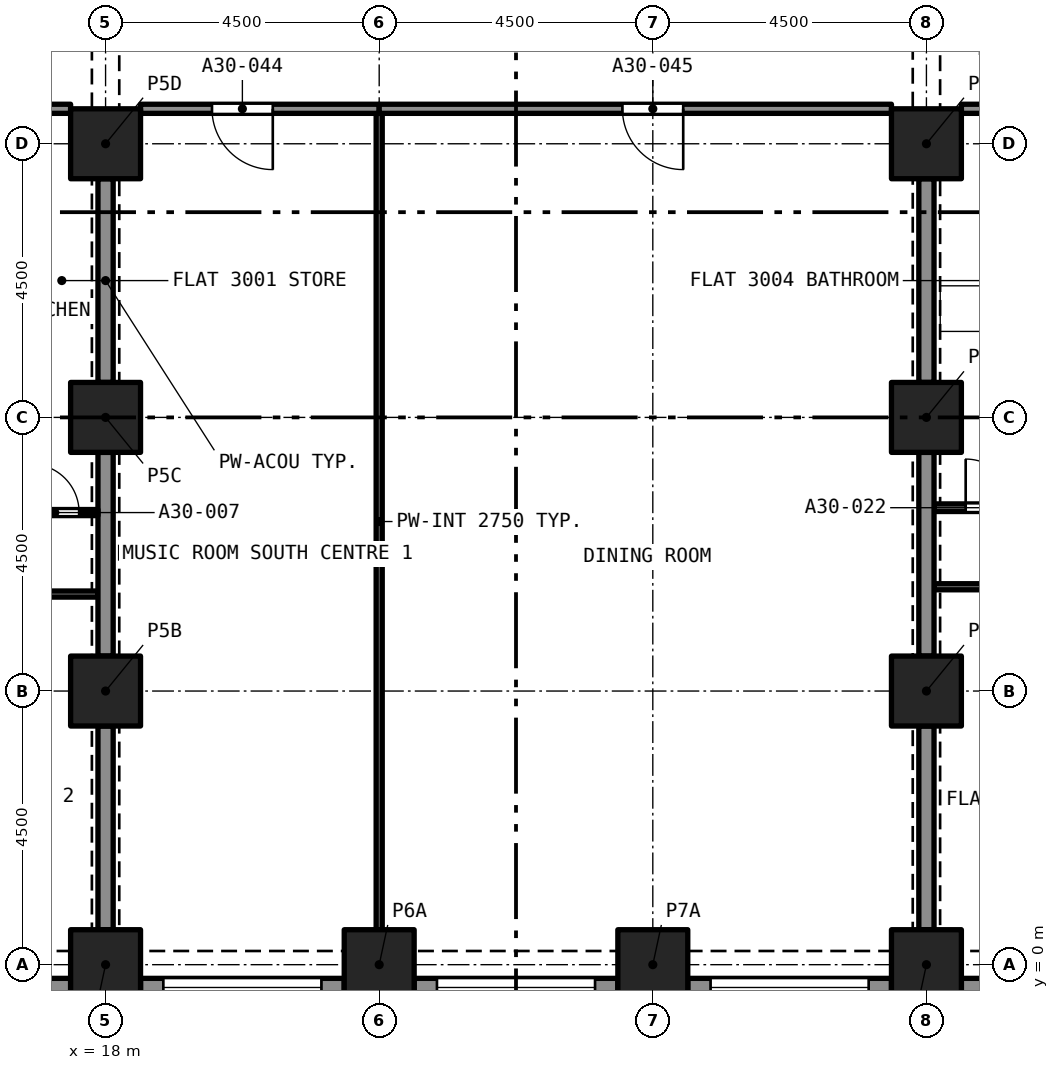
"""IFC4 building model, lengths in metres.
Left out: names, types, materials, properties, quantities, classifications, styles, units other than length and angle.
Written with IfcOpenShell. Run it as: python <this file> out.ifc"""

import sys

from ifc_helpers import new_model, si_unit, direction, frame, frame_2d, origin, origin_2d, place, context, subcontext, project, spatial, rectangle, extrude, element, fill, save


model = new_model("IFC4")
c1 = context("Model", 3, precision=1e-05, world=origin(), true_north=direction((0.0, 1.0)))
c2 = subcontext(c1, "Body", "Model", "MODEL_VIEW")
j1 = project(units=[si_unit("LENGTHUNIT", "METRE"), si_unit("PLANEANGLEUNIT", "RADIAN")], contexts=[c1])
p1 = place(None, origin())
s1 = spatial("IfcSite", under=j1, at=p1, CompositionType="ELEMENT")
p2 = place(p1, origin())
s2 = spatial("IfcBuilding", under=s1, at=p2, CompositionType="ELEMENT")
p3 = place(p2, frame((0.0, 0.0, 108.8)))
s3 = spatial("IfcBuildingStorey", under=s2, at=p3, CompositionType="ELEMENT", Elevation=108.8)
for number, where, z_axis, x_axis in (
    (1, (18.0, 0.0, 0.0), (0.0, 0.0, 1.0), (1.0, 0.0, 0.0)),
    (2, (22.5, 0.0, 0.0), (0.0, 0.0, 1.0), (1.0, 0.0, 0.0)),
    (3, (27.0, 0.0, 0.0), (0.0, 0.0, 1.0), (1.0, 0.0, 0.0)),
    (4, (31.5, 0.0, 0.0), (0.0, 0.0, 1.0), (1.0, 0.0, 0.0)),
    (5, (18.0, 4.5, 0.0), (0.0, 0.0, 1.0), (1.0, 0.0, 0.0)),
    (6, (31.5, 4.5, 0.0), (0.0, 0.0, 1.0), (1.0, 0.0, 0.0)),
    (7, (18.0, 9.0, 0.0), (0.0, 0.0, 1.0), (1.0, 0.0, 0.0)),
    (8, (31.5, 9.0, 0.0), (0.0, 0.0, 1.0), (1.0, 0.0, 0.0)),
    (9, (18.0, 13.5, 0.0), (0.0, 0.0, 1.0), (1.0, 0.0, 0.0)),
    (10, (31.5, 13.5, 0.0), (0.0, 0.0, 1.0), (1.0, 0.0, 0.0)),
):
    element("IfcColumn", number, at=place(p3, frame(where, z_axis=z_axis, x_axis=x_axis)), inside=s3, PredefinedType="COLUMN", context=c2, shape_type="SweptSolid", body=[
        extrude(rectangle(XDim=1.15, YDim=1.15, at=origin_2d()), origin(), (0.0, 0.0, 1.0), 3.2),
    ])
p4 = place(p3, frame((17.425, -0.375, 0.0), z_axis=(0.0, 0.0, 1.0), x_axis=(-1.0, 0.0, 0.0)))
e11 = element("IfcWall", 11, at=p4, inside=s3, PredefinedType="SOLIDWALL", context=c2, shape_type="SweptSolid", body=[
    extrude(rectangle(XDim=3.35, YDim=0.3, at=frame_2d((1.675, 0.0))), origin(), (0.0, 0.0, 1.0), 3.2),
])
p5 = place(p4, frame((0.375, 0.0, 0.45)))
e12 = element("IfcOpeningElement", 12, at=p5, cuts=e11, PredefinedType="OPENING", context=c2, shape_type="SweptSolid", body=[
    extrude(rectangle(XDim=2.6, YDim=1.95, at=frame_2d((1.3, 0.975))), frame((0.0, 0.16, 0.0), z_axis=(0.0, -1.0, 0.0), x_axis=(1.0, 0.0, 0.0)), (0.0, 0.0, 1.0), 0.32),
])
p6 = place(p3, frame((21.925, -0.375, 0.0), z_axis=(0.0, 0.0, 1.0), x_axis=(-1.0, 0.0, 0.0)))
e13 = element("IfcWall", 13, at=p6, inside=s3, PredefinedType="SOLIDWALL", context=c2, shape_type="SweptSolid", body=[
    extrude(rectangle(XDim=3.35, YDim=0.3, at=frame_2d((1.675, 0.0))), origin(), (0.0, 0.0, 1.0), 3.2),
])
p7 = place(p6, frame((0.375, 0.0, 0.45)))
e14 = element("IfcOpeningElement", 14, at=p7, cuts=e13, PredefinedType="OPENING", context=c2, shape_type="SweptSolid", body=[
    extrude(rectangle(XDim=2.6, YDim=1.95, at=frame_2d((1.3, 0.975))), frame((0.0, 0.16, 0.0), z_axis=(0.0, -1.0, 0.0), x_axis=(1.0, 0.0, 0.0)), (0.0, 0.0, 1.0), 0.32),
])
p8 = place(p3, frame((26.425, -0.375, 0.0), z_axis=(0.0, 0.0, 1.0), x_axis=(-1.0, 0.0, 0.0)))
e15 = element("IfcWall", 15, at=p8, inside=s3, PredefinedType="SOLIDWALL", context=c2, shape_type="SweptSolid", body=[
    extrude(rectangle(XDim=3.35, YDim=0.3, at=frame_2d((1.675, 0.0))), origin(), (0.0, 0.0, 1.0), 3.2),
])
p9 = place(p8, frame((0.375, 0.0, 0.45)))
e16 = element("IfcOpeningElement", 16, at=p9, cuts=e15, PredefinedType="OPENING", context=c2, shape_type="SweptSolid", body=[
    extrude(rectangle(XDim=2.6, YDim=1.95, at=frame_2d((1.3, 0.975))), frame((0.0, 0.16, 0.0), z_axis=(0.0, -1.0, 0.0), x_axis=(1.0, 0.0, 0.0)), (0.0, 0.0, 1.0), 0.32),
])
p10 = place(p3, frame((30.925, -0.375, 0.0), z_axis=(0.0, 0.0, 1.0), x_axis=(-1.0, 0.0, 0.0)))
e17 = element("IfcWall", 17, at=p10, inside=s3, PredefinedType="SOLIDWALL", context=c2, shape_type="SweptSolid", body=[
    extrude(rectangle(XDim=3.35, YDim=0.3, at=frame_2d((1.675, 0.0))), origin(), (0.0, 0.0, 1.0), 3.2),
])
p11 = place(p10, frame((0.375, 0.0, 0.45)))
e18 = element("IfcOpeningElement", 18, at=p11, cuts=e17, PredefinedType="OPENING", context=c2, shape_type="SweptSolid", body=[
    extrude(rectangle(XDim=2.6, YDim=1.95, at=frame_2d((1.3, 0.975))), frame((0.0, 0.16, 0.0), z_axis=(0.0, -1.0, 0.0), x_axis=(1.0, 0.0, 0.0)), (0.0, 0.0, 1.0), 0.32),
])
p12 = place(p3, frame((35.425, -0.375, 0.0), z_axis=(0.0, 0.0, 1.0), x_axis=(-1.0, 0.0, 0.0)))
e19 = element("IfcWall", 19, at=p12, inside=s3, PredefinedType="SOLIDWALL", context=c2, shape_type="SweptSolid", body=[
    extrude(rectangle(XDim=3.35, YDim=0.3, at=frame_2d((1.675, 0.0))), origin(), (0.0, 0.0, 1.0), 3.2),
])
p13 = place(p12, frame((0.375, 0.0, 0.45)))
e20 = element("IfcOpeningElement", 20, at=p13, cuts=e19, PredefinedType="OPENING", context=c2, shape_type="SweptSolid", body=[
    extrude(rectangle(XDim=2.6, YDim=1.95, at=frame_2d((1.3, 0.975))), frame((0.0, 0.16, 0.0), z_axis=(0.0, -1.0, 0.0), x_axis=(1.0, 0.0, 0.0)), (0.0, 0.0, 1.0), 0.32),
])
p14 = place(p3, frame((17.875, 6.095, 0.0), z_axis=(0.0, 0.0, 1.0), x_axis=(-1.0, 0.0, 0.0)))
e21 = element("IfcWall", 21, at=p14, inside=s3, PredefinedType="PARTITIONING", context=c2, shape_type="SweptSolid", body=[
    extrude(rectangle(XDim=4.375, YDim=0.1, at=frame_2d((2.188, 0.0))), origin(), (0.0, 0.0, 1.0), 2.9),
])
p15 = place(p14, frame((1.675, 0.0, 0.0)))
e22 = element("IfcOpeningElement", 22, at=p15, cuts=e21, PredefinedType="OPENING", context=c2, shape_type="SweptSolid", body=[
    extrude(rectangle(XDim=0.9, YDim=2.1, at=frame_2d((0.45, 1.05))), frame((0.0, 0.06, 0.0), z_axis=(0.0, -1.0, 0.0), x_axis=(1.0, 0.0, 0.0)), (0.0, 0.0, 1.0), 0.12),
])
for number, where, z_axis, x_axis in (
    (23, (18.0, 5.075, 0.0), (0.0, 0.0, 1.0), (0.0, 1.0, 0.0)),
    (24, (18.0, 0.575, 0.0), (0.0, 0.0, 1.0), (0.0, 1.0, 0.0)),
):
    element("IfcWall", number, at=place(p3, frame(where, z_axis=z_axis, x_axis=x_axis)), inside=s3, PredefinedType="PARTITIONING", context=c2, shape_type="SweptSolid", body=[
        extrude(rectangle(XDim=3.35, YDim=0.25, at=frame_2d((1.675, 0.0))), origin(), (0.0, 0.0, 1.0), 2.38),
    ])
p16 = place(p3, frame((16.635, 7.435, 0.0), z_axis=(0.0, 0.0, 1.0), x_axis=(1.0, 0.0, 0.0)))
e25 = element("IfcWall", 25, at=p16, inside=s3, PredefinedType="PARTITIONING", context=c2, shape_type="SweptSolid", body=[
    extrude(rectangle(XDim=1.24, YDim=0.1, at=frame_2d((0.62, 0.0))), origin(), (0.0, 0.0, 1.0), 2.9),
])
p17 = place(p16, frame((0.13, 0.0, 0.0)))
e26 = element("IfcOpeningElement", 26, at=p17, cuts=e25, PredefinedType="OPENING", context=c2, shape_type="SweptSolid", body=[
    extrude(rectangle(XDim=0.8, YDim=2.1, at=frame_2d((0.4, 1.05))), frame((0.0, 0.06, 0.0), z_axis=(0.0, -1.0, 0.0), x_axis=(1.0, 0.0, 0.0)), (0.0, 0.0, 1.0), 0.12),
])
p18 = place(p3, frame((14.25, 14.075, 0.0), z_axis=(0.0, 0.0, 1.0), x_axis=(1.0, 0.0, 0.0)))
e27 = element("IfcWall", 27, at=p18, inside=s3, PredefinedType="PARTITIONING", context=c2, shape_type="SweptSolid", body=[
    extrude(rectangle(XDim=3.175, YDim=0.15, at=frame_2d((1.587, 0.0))), origin(), (0.0, 0.0, 1.0), 2.9),
])
p19 = place(p3, frame((18.0, 9.575, 0.0), z_axis=(0.0, 0.0, 1.0), x_axis=(0.0, 1.0, 0.0)))
e28 = element("IfcWall", 28, at=p19, inside=s3, PredefinedType="PARTITIONING", context=c2, shape_type="SweptSolid", body=[
    extrude(rectangle(XDim=3.35, YDim=0.25, at=frame_2d((1.675, 0.0))), origin(), (0.0, 0.0, 1.0), 2.38),
])
p20 = place(p3, frame((31.625, 7.515, 0.0), z_axis=(0.0, 0.0, 1.0), x_axis=(1.0, 0.0, 0.0)))
e29 = element("IfcWall", 29, at=p20, inside=s3, PredefinedType="PARTITIONING", context=c2, shape_type="SweptSolid", body=[
    extrude(rectangle(XDim=1.966, YDim=0.125, at=frame_2d((0.983, 0.0))), origin(), (0.0, 0.0, 1.0), 2.9),
])
p21 = place(p20, frame((0.521, 0.0, 0.0)))
e30 = element("IfcOpeningElement", 30, at=p21, cuts=e29, PredefinedType="OPENING", context=c2, shape_type="SweptSolid", body=[
    extrude(rectangle(XDim=0.8, YDim=2.1, at=frame_2d((0.4, 1.05))), frame((0.0, 0.073, 0.0), z_axis=(0.0, -1.0, 0.0), x_axis=(1.0, 0.0, 0.0)), (0.0, 0.0, 1.0), 0.145),
])
p22 = place(p3, frame((31.5, 9.575, 0.0), z_axis=(0.0, 0.0, 1.0), x_axis=(0.0, 1.0, 0.0)))
e31 = element("IfcWall", 31, at=p22, inside=s3, PredefinedType="PARTITIONING", context=c2, shape_type="SweptSolid", body=[
    extrude(rectangle(XDim=3.35, YDim=0.25, at=frame_2d((1.675, 0.0))), origin(), (0.0, 0.0, 1.0), 2.38),
])
p23 = place(p3, frame((32.075, 14.075, 0.0), z_axis=(0.0, 0.0, 1.0), x_axis=(1.0, 0.0, 0.0)))
e32 = element("IfcWall", 32, at=p23, inside=s3, PredefinedType="PARTITIONING", context=c2, shape_type="SweptSolid", body=[
    extrude(rectangle(XDim=3.175, YDim=0.15, at=frame_2d((1.587, 0.0))), origin(), (0.0, 0.0, 1.0), 2.9),
])
p24 = place(p3, frame((36.0, 6.215, 0.0), z_axis=(0.0, 0.0, 1.0), x_axis=(-1.0, 0.0, 0.0)))
e33 = element("IfcWall", 33, at=p24, inside=s3, PredefinedType="PARTITIONING", context=c2, shape_type="SweptSolid", body=[
    extrude(rectangle(XDim=4.375, YDim=0.1, at=frame_2d((2.188, 0.0))), origin(), (0.0, 0.0, 1.0), 2.9),
])
p25 = place(p24, frame((1.75, 0.0, 0.0)))
e34 = element("IfcOpeningElement", 34, at=p25, cuts=e33, PredefinedType="OPENING", context=c2, shape_type="SweptSolid", body=[
    extrude(rectangle(XDim=1.0, YDim=2.1, at=frame_2d((0.5, 1.05))), frame((0.0, 0.06, 0.0), z_axis=(0.0, -1.0, 0.0), x_axis=(1.0, 0.0, 0.0)), (0.0, 0.0, 1.0), 0.12),
])
for number, where, z_axis, x_axis in (
    (35, (31.5, 0.575, 0.0), (0.0, 0.0, 1.0), (0.0, 1.0, 0.0)),
    (36, (31.5, 5.075, 0.0), (0.0, 0.0, 1.0), (0.0, 1.0, 0.0)),
):
    element("IfcWall", number, at=place(p3, frame(where, z_axis=z_axis, x_axis=x_axis)), inside=s3, PredefinedType="PARTITIONING", context=c2, shape_type="SweptSolid", body=[
        extrude(rectangle(XDim=3.35, YDim=0.25, at=frame_2d((1.675, 0.0))), origin(), (0.0, 0.0, 1.0), 2.38),
    ])
p26 = place(p3, frame((22.5, 0.575, 0.0), z_axis=(0.0, 0.0, 1.0), x_axis=(0.0, 1.0, 0.0)))
e37 = element("IfcWall", 37, at=p26, inside=s3, PredefinedType="PARTITIONING", context=c2, shape_type="SweptSolid", body=[
    extrude(rectangle(XDim=13.425, YDim=0.1, at=frame_2d((6.712, 0.0))), origin(), (0.0, 0.0, 1.0), 2.75),
])
p27 = place(p3, frame((22.5, 14.075, 0.0), z_axis=(0.0, 0.0, 1.0), x_axis=(-1.0, 0.0, 0.0)))
e38 = element("IfcWall", 38, at=p27, inside=s3, PredefinedType="PARTITIONING", context=c2, shape_type="SweptSolid", body=[
    extrude(rectangle(XDim=3.925, YDim=0.15, at=frame_2d((1.962, 0.0))), origin(), (0.0, 0.0, 1.0), 2.75),
])
p28 = place(p27, frame((1.75, 0.0, 0.0)))
e39 = element("IfcOpeningElement", 39, at=p28, cuts=e38, PredefinedType="OPENING", context=c2, shape_type="SweptSolid", body=[
    extrude(rectangle(XDim=1.0, YDim=2.1, at=frame_2d((0.5, 1.05))), frame((0.0, 0.085, 0.0), z_axis=(0.0, -1.0, 0.0), x_axis=(1.0, 0.0, 0.0)), (0.0, 0.0, 1.0), 0.17),
])
p29 = place(p3, frame((30.925, 14.075, 0.0), z_axis=(0.0, 0.0, 1.0), x_axis=(-1.0, 0.0, 0.0)))
e40 = element("IfcWall", 40, at=p29, inside=s3, PredefinedType="PARTITIONING", context=c2, shape_type="SweptSolid", body=[
    extrude(rectangle(XDim=8.425, YDim=0.15, at=frame_2d((4.212, 0.0))), origin(), (0.0, 0.0, 1.0), 2.75),
])
p30 = place(p29, frame((3.425, 0.0, 0.0)))
e41 = element("IfcOpeningElement", 41, at=p30, cuts=e40, PredefinedType="OPENING", context=c2, shape_type="SweptSolid", body=[
    extrude(rectangle(XDim=1.0, YDim=2.1, at=frame_2d((0.5, 1.05))), frame((0.0, 0.085, 0.0), z_axis=(0.0, -1.0, 0.0), x_axis=(1.0, 0.0, 0.0)), (0.0, 0.0, 1.0), 0.17),
])
p31 = place(p7, origin())
e42 = element("IfcWindow", 42, at=p31, inside=s3, PartitioningType="SINGLE_PANEL", PredefinedType="WINDOW", context=c2, shape_type="SweptSolid", body=[
    extrude(rectangle(XDim=2.6, YDim=1.95, at=frame_2d((1.3, 0.975))), frame((0.0, 0.03, 0.0), z_axis=(0.0, -1.0, 0.0), x_axis=(1.0, 0.0, 0.0)), (0.0, 0.0, 1.0), 0.06),
])
fill(e14, e42)
p32 = place(p9, origin())
e43 = element("IfcWindow", 43, at=p32, inside=s3, PartitioningType="SINGLE_PANEL", PredefinedType="WINDOW", context=c2, shape_type="SweptSolid", body=[
    extrude(rectangle(XDim=2.6, YDim=1.95, at=frame_2d((1.3, 0.975))), frame((0.0, 0.03, 0.0), z_axis=(0.0, -1.0, 0.0), x_axis=(1.0, 0.0, 0.0)), (0.0, 0.0, 1.0), 0.06),
])
fill(e16, e43)
p33 = place(p11, origin())
e44 = element("IfcWindow", 44, at=p33, inside=s3, PartitioningType="SINGLE_PANEL", PredefinedType="WINDOW", context=c2, shape_type="SweptSolid", body=[
    extrude(rectangle(XDim=2.6, YDim=1.95, at=frame_2d((1.3, 0.975))), frame((0.0, 0.03, 0.0), z_axis=(0.0, -1.0, 0.0), x_axis=(1.0, 0.0, 0.0)), (0.0, 0.0, 1.0), 0.06),
])
fill(e18, e44)
p34 = place(p17, origin())
e45 = element("IfcDoor", 45, at=p34, inside=s3, OperationType="SINGLE_SWING_LEFT", PredefinedType="DOOR", context=c2, shape_type="SweptSolid", body=[
    extrude(rectangle(XDim=0.8, YDim=2.1, at=frame_2d((0.4, 1.05))), frame((0.0, 0.025, 0.0), z_axis=(0.0, -1.0, 0.0), x_axis=(1.0, 0.0, 0.0)), (0.0, 0.0, 1.0), 0.05),
])
fill(e26, e45)
p35 = place(p21, origin())
e46 = element("IfcDoor", 46, at=p35, inside=s3, OperationType="SINGLE_SWING_LEFT", PredefinedType="DOOR", context=c2, shape_type="SweptSolid", body=[
    extrude(rectangle(XDim=0.8, YDim=2.1, at=frame_2d((0.4, 1.05))), frame((0.0, 0.025, 0.0), z_axis=(0.0, -1.0, 0.0), x_axis=(1.0, 0.0, 0.0)), (0.0, 0.0, 1.0), 0.05),
])
fill(e30, e46)
p36 = place(p28, origin())
e47 = element("IfcDoor", 47, at=p36, inside=s3, OperationType="SINGLE_SWING_RIGHT", PredefinedType="DOOR", context=c2, shape_type="SweptSolid", body=[
    extrude(rectangle(XDim=1.0, YDim=2.1, at=frame_2d((0.5, 1.05))), frame((0.0, 0.025, 0.0), z_axis=(0.0, -1.0, 0.0), x_axis=(1.0, 0.0, 0.0)), (0.0, 0.0, 1.0), 0.05),
])
fill(e39, e47)
p37 = place(p30, origin())
e48 = element("IfcDoor", 48, at=p37, inside=s3, OperationType="SINGLE_SWING_LEFT", PredefinedType="DOOR", context=c2, shape_type="SweptSolid", body=[
    extrude(rectangle(XDim=1.0, YDim=2.1, at=frame_2d((0.5, 1.05))), frame((0.0, 0.025, 0.0), z_axis=(0.0, -1.0, 0.0), x_axis=(1.0, 0.0, 0.0)), (0.0, 0.0, 1.0), 0.05),
])
fill(e41, e48)
save(model, sys.argv[1])
